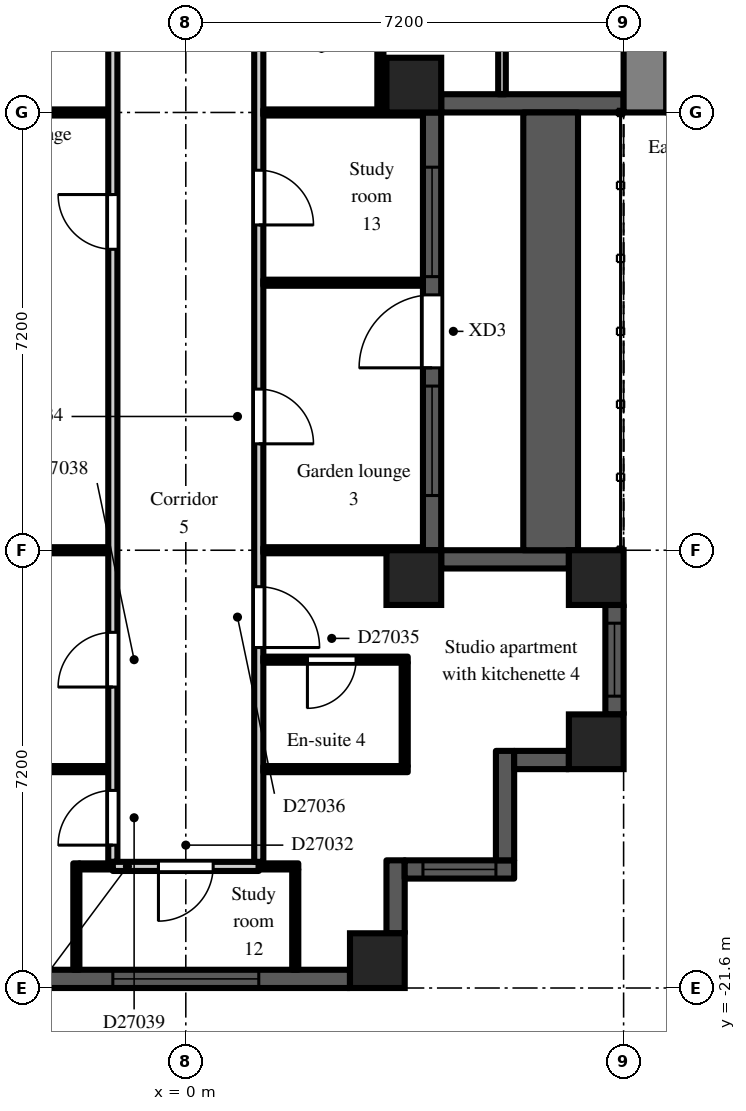
"""IFC4 building model, lengths in metres.
Left out: names, types, materials, properties, quantities, classifications, styles, units other than length and angle.
Written with IfcOpenShell. Run it as: python <this file> out.ifc"""

import sys

from ifc_helpers import new_model, si_unit, direction, frame, frame_2d, origin, origin_2d, place, context, subcontext, project, spatial, rectangle, extrude, element, fill, save


model = new_model("IFC4")
c1 = context("Model", 3, precision=1e-05, world=origin(), true_north=direction((0.0, 1.0)))
c2 = subcontext(c1, "Body", "Model", "MODEL_VIEW")
j1 = project(units=[si_unit("LENGTHUNIT", "METRE"), si_unit("PLANEANGLEUNIT", "RADIAN")], contexts=[c1])
p1 = place(None, origin())
s1 = spatial("IfcSite", under=j1, at=p1, CompositionType="ELEMENT")
p2 = place(p1, origin())
s2 = spatial("IfcBuilding", under=s1, at=p2, CompositionType="ELEMENT")
p3 = place(p2, frame((0.0, 0.0, 188.7)))
s3 = spatial("IfcBuildingStorey", under=s2, at=p3, CompositionType="ELEMENT", Elevation=188.7)
for number, where, z_axis, x_axis in (
    (1, (3.15, -21.15, 0.0), (0.0, 0.0, 1.0), (1.0, 0.0, 0.0)),
    (2, (3.75, -14.85, 0.0), (0.0, 0.0, 1.0), (1.0, 0.0, 0.0)),
    (3, (3.75, -6.75, 0.0), (0.0, 0.0, 1.0), (1.0, 0.0, 0.0)),
    (4, (6.75, -17.55, 0.0), (0.0, 0.0, 1.0), (1.0, 0.0, 0.0)),
    (5, (6.75, -14.85, 0.0), (0.0, 0.0, 1.0), (1.0, 0.0, 0.0)),
):
    element("IfcColumn", number, at=place(p3, frame(where, z_axis=z_axis, x_axis=x_axis)), inside=s3, PredefinedType="COLUMN", context=c2, shape_type="SweptSolid", body=[
        extrude(rectangle(XDim=0.9, YDim=0.9, at=origin_2d()), origin(), (0.0, 0.0, 1.0), 3.0),
    ])
p4 = place(p3, frame((-2.7, -21.45, 0.0), z_axis=(0.0, 0.0, 1.0), x_axis=(1.0, 0.0, 0.0)))
e6 = element("IfcWall", 6, at=p4, inside=s3, PredefinedType="SOLIDWALL", context=c2, shape_type="SweptSolid", body=[
    extrude(rectangle(XDim=5.4, YDim=0.3, at=frame_2d((2.7, 0.0))), origin(), (0.0, 0.0, 1.0), 2.2),
])
p5 = place(p4, frame((1.5, 0.0, 0.2)))
e7 = element("IfcOpeningElement", 7, at=p5, cuts=e6, PredefinedType="OPENING", context=c2, shape_type="SweptSolid", body=[
    extrude(rectangle(XDim=2.4, YDim=1.85, at=frame_2d((1.2, 0.925))), frame((0.0, 0.16, 0.0), z_axis=(0.0, -1.0, 0.0), x_axis=(1.0, 0.0, 0.0)), (0.0, 0.0, 1.0), 0.32),
])
p6 = place(p3, frame((3.45, -20.7, 0.0), z_axis=(0.0, 0.0, 1.0), x_axis=(0.0, 1.0, 0.0)))
e8 = element("IfcWall", 8, at=p6, inside=s3, PredefinedType="SOLIDWALL", context=c2, shape_type="SweptSolid", body=[
    extrude(rectangle(XDim=1.2, YDim=0.3, at=frame_2d((0.6, 0.0))), origin(), (0.0, 0.0, 1.0), 2.6),
])
p7 = place(p3, frame((3.6, -19.65, 0.0), z_axis=(0.0, 0.0, 1.0), x_axis=(1.0, 0.0, 0.0)))
e9 = element("IfcWall", 9, at=p7, inside=s3, PredefinedType="SOLIDWALL", context=c2, shape_type="SweptSolid", body=[
    extrude(rectangle(XDim=1.8, YDim=0.3, at=frame_2d((0.9, 0.0))), origin(), (0.0, 0.0, 1.0), 2.6),
])
p8 = place(p7, frame((0.3, 0.0, 0.2)))
e10 = element("IfcOpeningElement", 10, at=p8, cuts=e9, PredefinedType="OPENING", context=c2, shape_type="SweptSolid", body=[
    extrude(rectangle(XDim=1.2, YDim=1.85, at=frame_2d((0.6, 0.925))), frame((0.0, 0.16, 0.0), z_axis=(0.0, -1.0, 0.0), x_axis=(1.0, 0.0, 0.0)), (0.0, 0.0, 1.0), 0.32),
])
p9 = place(p3, frame((5.25, -19.5, 0.0), z_axis=(0.0, 0.0, 1.0), x_axis=(0.0, 1.0, 0.0)))
e11 = element("IfcWall", 11, at=p9, inside=s3, PredefinedType="SOLIDWALL", context=c2, shape_type="SweptSolid", body=[
    extrude(rectangle(XDim=1.8, YDim=0.3, at=frame_2d((0.9, 0.0))), origin(), (0.0, 0.0, 1.0), 2.6),
])
p10 = place(p3, frame((5.4, -17.85, 0.0), z_axis=(0.0, 0.0, 1.0), x_axis=(1.0, 0.0, 0.0)))
e12 = element("IfcWall", 12, at=p10, inside=s3, PredefinedType="SOLIDWALL", context=c2, shape_type="SweptSolid", body=[
    extrude(rectangle(XDim=0.9, YDim=0.3, at=frame_2d((0.45, 0.0))), origin(), (0.0, 0.0, 1.0), 2.6),
])
p11 = place(p3, frame((7.05, -17.1, 0.0), z_axis=(0.0, 0.0, 1.0), x_axis=(0.0, 1.0, 0.0)))
e13 = element("IfcWall", 13, at=p11, inside=s3, PredefinedType="SOLIDWALL", context=c2, shape_type="SweptSolid", body=[
    extrude(rectangle(XDim=1.8, YDim=0.3, at=frame_2d((0.9, 0.0))), origin(), (0.0, 0.0, 1.0), 2.2),
])
p12 = place(p11, frame((0.3, 0.0, 0.2)))
e14 = element("IfcOpeningElement", 14, at=p12, cuts=e13, PredefinedType="OPENING", context=c2, shape_type="SweptSolid", body=[
    extrude(rectangle(XDim=1.2, YDim=1.85, at=frame_2d((0.6, 0.925))), frame((0.0, 0.16, 0.0), z_axis=(0.0, -1.0, 0.0), x_axis=(1.0, 0.0, 0.0)), (0.0, 0.0, 1.0), 0.32),
])
p13 = place(p3, frame((6.3, -14.55, 0.0), z_axis=(0.0, 0.0, 1.0), x_axis=(-1.0, 0.0, 0.0)))
e15 = element("IfcWall", 15, at=p13, inside=s3, PredefinedType="SOLIDWALL", context=c2, shape_type="SweptSolid", body=[
    extrude(rectangle(XDim=2.1, YDim=0.3, at=frame_2d((1.05, 0.0))), origin(), (0.0, 0.0, 1.0), 2.2),
])
p14 = place(p3, frame((4.05, -14.4, 0.0), z_axis=(0.0, 0.0, 1.0), x_axis=(0.0, 1.0, 0.0)))
e16 = element("IfcWall", 16, at=p14, inside=s3, PredefinedType="SOLIDWALL", context=c2, shape_type="SweptSolid", body=[
    extrude(rectangle(XDim=7.2, YDim=0.3, at=frame_2d((3.6, 0.0))), origin(), (0.0, 0.0, 1.0), 2.2),
])
p15 = place(p14, frame((3.0, 0.0, 0.0)))
e17 = element("IfcOpeningElement", 17, at=p15, cuts=e16, PredefinedType="OPENING", context=c2, shape_type="SweptSolid", body=[
    extrude(rectangle(XDim=1.2, YDim=2.05, at=frame_2d((0.6, 1.025))), frame((0.0, 0.16, 0.0), z_axis=(0.0, -1.0, 0.0), x_axis=(1.0, 0.0, 0.0)), (0.0, 0.0, 1.0), 0.32),
])
p16 = place(p14, frame((0.9, 0.0, 0.2)))
e18 = element("IfcOpeningElement", 18, at=p16, cuts=e16, PredefinedType="OPENING", context=c2, shape_type="SweptSolid", body=[
    extrude(rectangle(XDim=1.8, YDim=1.85, at=frame_2d((0.9, 0.925))), frame((0.0, 0.16, 0.0), z_axis=(0.0, -1.0, 0.0), x_axis=(1.0, 0.0, 0.0)), (0.0, 0.0, 1.0), 0.32),
])
p17 = place(p14, frame((4.5, 0.0, 0.2)))
e19 = element("IfcOpeningElement", 19, at=p17, cuts=e16, PredefinedType="OPENING", context=c2, shape_type="SweptSolid", body=[
    extrude(rectangle(XDim=1.8, YDim=1.85, at=frame_2d((0.9, 0.925))), frame((0.0, 0.16, 0.0), z_axis=(0.0, -1.0, 0.0), x_axis=(1.0, 0.0, 0.0)), (0.0, 0.0, 1.0), 0.32),
])
p18 = place(p3, frame((4.2, -7.05, 0.0), z_axis=(0.0, 0.0, 1.0), x_axis=(1.0, 0.0, 0.0)))
e20 = element("IfcWall", 20, at=p18, inside=s3, PredefinedType="SOLIDWALL", context=c2, shape_type="SweptSolid", body=[
    extrude(rectangle(XDim=3.0, YDim=0.3, at=frame_2d((1.5, 0.0))), origin(), (0.0, 0.0, 1.0), 2.2),
])
p19 = place(p3, frame((6.0, -14.4, 0.0), z_axis=(0.0, 0.0, 1.0), x_axis=(0.0, 1.0, 0.0)))
e21 = element("IfcWall", 21, at=p19, inside=s3, PredefinedType="PARAPET", context=c2, shape_type="SweptSolid", body=[
    extrude(rectangle(XDim=7.2, YDim=0.9, at=frame_2d((3.6, 0.0))), origin(), (0.0, 0.0, 1.0), 0.8),
])
p20 = place(p3, frame((7.55, -7.2, 0.0), z_axis=(0.0, 0.0, 1.0), x_axis=(0.0, 1.0, 0.0)))
e22 = element("IfcWall", 22, at=p20, inside=s3, PredefinedType="SHEAR", context=c2, shape_type="SweptSolid", body=[
    extrude(rectangle(XDim=14.4, YDim=0.7, at=frame_2d((7.2, 0.0))), origin(), (0.0, 0.0, 1.0), 2.6),
])
p21 = place(p20, frame((6.0, 0.0, 0.0)))
e23 = element("IfcOpeningElement", 23, at=p21, cuts=e22, PredefinedType="OPENING", context=c2, shape_type="SweptSolid", body=[
    extrude(rectangle(XDim=2.4, YDim=2.2, at=frame_2d((1.2, 1.1))), frame((0.0, 0.36, 0.0), z_axis=(0.0, -1.0, 0.0), x_axis=(1.0, 0.0, 0.0)), (0.0, 0.0, 1.0), 0.72),
])
p22 = place(p3, frame((-5.1, -18.0, 0.0), z_axis=(0.0, 0.0, 1.0), x_axis=(1.0, 0.0, 0.0)))
e24 = element("IfcWall", 24, at=p22, inside=s3, PredefinedType="PARTITIONING", context=c2, shape_type="SweptSolid", body=[
    extrude(rectangle(XDim=3.825, YDim=0.1, at=frame_2d((1.913, 0.0))), origin(), (0.0, 0.0, 1.0), 2.6),
])
for number, where, z_axis, x_axis in (
    (25, (-3.9, -14.4, 0.0), (0.0, 0.0, 1.0), (1.0, 0.0, 0.0)),
    (26, (-3.9, -7.2, 0.0), (0.0, 0.0, 1.0), (1.0, 0.0, 0.0)),
):
    element("IfcWall", number, at=place(p3, frame(where, z_axis=z_axis, x_axis=x_axis)), inside=s3, PredefinedType="PARTITIONING", context=c2, shape_type="SweptSolid", body=[
        extrude(rectangle(XDim=2.625, YDim=0.1, at=frame_2d((1.312, 0.0))), origin(), (0.0, 0.0, 1.0), 2.6),
    ])
p23 = place(p3, frame((-1.8, -21.3, 0.0), z_axis=(0.0, 0.0, 1.0), x_axis=(0.0, 1.0, 0.0)))
e27 = element("IfcWall", 27, at=p23, inside=s3, PredefinedType="PARTITIONING", context=c2, shape_type="SweptSolid", body=[
    extrude(rectangle(XDim=1.75, YDim=0.1, at=frame_2d((0.875, 0.0))), origin(), (0.0, 0.0, 1.0), 2.6),
])
p24 = place(p3, frame((-1.75, -19.6, 0.0), z_axis=(0.0, 0.0, 1.0), x_axis=(1.0, 0.0, 0.0)))
e28 = element("IfcWall", 28, at=p24, inside=s3, PredefinedType="PARTITIONING", context=c2, shape_type="SweptSolid", body=[
    extrude(rectangle(XDim=0.55, YDim=0.1, at=frame_2d((0.275, 0.0))), origin(), (0.0, 0.0, 1.0), 2.6),
])
p25 = place(p3, frame((-1.2, -19.525, 0.0), z_axis=(0.0, 0.0, 1.0), x_axis=(0.0, 1.0, 0.0)))
e29 = element("IfcWall", 29, at=p25, inside=s3, PredefinedType="PARTITIONING", context=c2, shape_type="SweptSolid", body=[
    extrude(rectangle(XDim=18.25, YDim=0.15, at=frame_2d((9.125, 0.0))), origin(), (0.0, 0.0, 1.0), 2.6),
])
p26 = place(p25, frame((10.075, 0.0, 0.0)))
e30 = element("IfcOpeningElement", 30, at=p26, cuts=e29, PredefinedType="OPENING", context=c2, shape_type="SweptSolid", body=[
    extrude(rectangle(XDim=0.9, YDim=2.1, at=frame_2d((0.45, 1.05))), frame((0.0, 0.085, 0.0), z_axis=(0.0, -1.0, 0.0), x_axis=(1.0, 0.0, 0.0)), (0.0, 0.0, 1.0), 0.17),
])
p27 = place(p25, frame((2.875, 0.0, 0.0)))
e31 = element("IfcOpeningElement", 31, at=p27, cuts=e29, PredefinedType="OPENING", context=c2, shape_type="SweptSolid", body=[
    extrude(rectangle(XDim=0.9, YDim=2.1, at=frame_2d((0.45, 1.05))), frame((0.0, 0.085, 0.0), z_axis=(0.0, -1.0, 0.0), x_axis=(1.0, 0.0, 0.0)), (0.0, 0.0, 1.0), 0.17),
])
p28 = place(p25, frame((0.275, 0.0, 0.0)))
e32 = element("IfcOpeningElement", 32, at=p28, cuts=e29, PredefinedType="OPENING", context=c2, shape_type="SweptSolid", body=[
    extrude(rectangle(XDim=0.9, YDim=2.1, at=frame_2d((0.45, 1.05))), frame((0.0, 0.085, 0.0), z_axis=(0.0, -1.0, 0.0), x_axis=(1.0, 0.0, 0.0)), (0.0, 0.0, 1.0), 0.17),
])
p29 = place(p3, frame((-1.2, -19.6, 0.0), z_axis=(0.0, 0.0, 1.0), x_axis=(1.0, 0.0, 0.0)))
e33 = element("IfcWall", 33, at=p29, inside=s3, PredefinedType="PARTITIONING", context=c2, shape_type="SweptSolid", body=[
    extrude(rectangle(XDim=2.4, YDim=0.15, at=frame_2d((1.2, 0.0))), origin(), (0.0, 0.0, 1.0), 2.6),
])
p30 = place(p29, frame((0.75, 0.0, 0.0)))
e34 = element("IfcOpeningElement", 34, at=p30, cuts=e33, PredefinedType="OPENING", context=c2, shape_type="SweptSolid", body=[
    extrude(rectangle(XDim=0.9, YDim=2.1, at=frame_2d((0.45, 1.05))), frame((0.0, 0.085, 0.0), z_axis=(0.0, -1.0, 0.0), x_axis=(1.0, 0.0, 0.0)), (0.0, 0.0, 1.0), 0.17),
])
p31 = place(p3, frame((1.2, -19.525, 0.0), z_axis=(0.0, 0.0, 1.0), x_axis=(0.0, 1.0, 0.0)))
e35 = element("IfcWall", 35, at=p31, inside=s3, PredefinedType="PARTITIONING", context=c2, shape_type="SweptSolid", body=[
    extrude(rectangle(XDim=18.4, YDim=0.15, at=frame_2d((9.2, 0.0))), origin(), (0.0, 0.0, 1.0), 2.6),
])
p32 = place(p31, frame((14.875, 0.0, 0.0)))
e36 = element("IfcOpeningElement", 36, at=p32, cuts=e35, PredefinedType="OPENING", context=c2, shape_type="SweptSolid", body=[
    extrude(rectangle(XDim=0.9, YDim=2.1, at=frame_2d((0.45, 1.05))), frame((0.0, 0.085, 0.0), z_axis=(0.0, -1.0, 0.0), x_axis=(1.0, 0.0, 0.0)), (0.0, 0.0, 1.0), 0.17),
])
p33 = place(p31, frame((10.475, 0.0, 0.0)))
e37 = element("IfcOpeningElement", 37, at=p33, cuts=e35, PredefinedType="OPENING", context=c2, shape_type="SweptSolid", body=[
    extrude(rectangle(XDim=0.9, YDim=2.1, at=frame_2d((0.45, 1.05))), frame((0.0, 0.085, 0.0), z_axis=(0.0, -1.0, 0.0), x_axis=(1.0, 0.0, 0.0)), (0.0, 0.0, 1.0), 0.17),
])
p34 = place(p31, frame((6.875, 0.0, 0.0)))
e38 = element("IfcOpeningElement", 38, at=p34, cuts=e35, PredefinedType="OPENING", context=c2, shape_type="SweptSolid", body=[
    extrude(rectangle(XDim=0.9, YDim=2.1, at=frame_2d((0.45, 1.05))), frame((0.0, 0.085, 0.0), z_axis=(0.0, -1.0, 0.0), x_axis=(1.0, 0.0, 0.0)), (0.0, 0.0, 1.0), 0.17),
])
p35 = place(p31, frame((3.525, 0.0, 0.0)))
e39 = element("IfcOpeningElement", 39, at=p35, cuts=e35, PredefinedType="OPENING", context=c2, shape_type="SweptSolid", body=[
    extrude(rectangle(XDim=1.0, YDim=2.1, at=frame_2d((0.5, 1.05))), frame((0.0, 0.085, 0.0), z_axis=(0.0, -1.0, 0.0), x_axis=(1.0, 0.0, 0.0)), (0.0, 0.0, 1.0), 0.17),
])
p36 = place(p3, frame((1.2, -19.6, 0.0), z_axis=(0.0, 0.0, 1.0), x_axis=(1.0, 0.0, 0.0)))
e40 = element("IfcWall", 40, at=p36, inside=s3, PredefinedType="PARTITIONING", context=c2, shape_type="SweptSolid", body=[
    extrude(rectangle(XDim=0.65, YDim=0.1, at=frame_2d((0.325, 0.0))), origin(), (0.0, 0.0, 1.0), 2.6),
])
p37 = place(p3, frame((1.275, -18.0, 0.0), z_axis=(0.0, 0.0, 1.0), x_axis=(1.0, 0.0, 0.0)))
e41 = element("IfcWall", 41, at=p37, inside=s3, PredefinedType="PARTITIONING", context=c2, shape_type="SweptSolid", body=[
    extrude(rectangle(XDim=2.375, YDim=0.1, at=frame_2d((1.188, 0.0))), origin(), (0.0, 0.0, 1.0), 2.6),
])
p38 = place(p3, frame((1.275, -16.2, 0.0), z_axis=(0.0, 0.0, 1.0), x_axis=(1.0, 0.0, 0.0)))
e42 = element("IfcWall", 42, at=p38, inside=s3, PredefinedType="PARTITIONING", context=c2, shape_type="SweptSolid", body=[
    extrude(rectangle(XDim=2.375, YDim=0.1, at=frame_2d((1.188, 0.0))), origin(), (0.0, 0.0, 1.0), 2.6),
])
p39 = place(p38, frame((0.725, 0.0, 0.0)))
e43 = element("IfcOpeningElement", 43, at=p39, cuts=e42, PredefinedType="OPENING", context=c2, shape_type="SweptSolid", body=[
    extrude(rectangle(XDim=0.8, YDim=2.1, at=frame_2d((0.4, 1.05))), frame((0.0, 0.06, 0.0), z_axis=(0.0, -1.0, 0.0), x_axis=(1.0, 0.0, 0.0)), (0.0, 0.0, 1.0), 0.12),
])
for number, where, z_axis, x_axis in (
    (44, (1.275, -14.4, 0.0), (0.0, 0.0, 1.0), (1.0, 0.0, 0.0)),
    (45, (1.275, -10.0, 0.0), (0.0, 0.0, 1.0), (1.0, 0.0, 0.0)),
    (46, (1.275, -7.2, 0.0), (0.0, 0.0, 1.0), (1.0, 0.0, 0.0)),
):
    element("IfcWall", number, at=place(p3, frame(where, z_axis=z_axis, x_axis=x_axis)), inside=s3, PredefinedType="PARTITIONING", context=c2, shape_type="SweptSolid", body=[
        extrude(rectangle(XDim=2.625, YDim=0.1, at=frame_2d((1.312, 0.0))), origin(), (0.0, 0.0, 1.0), 2.6),
    ])
p40 = place(p3, frame((1.8, -21.3, 0.0), z_axis=(0.0, 0.0, 1.0), x_axis=(0.0, 1.0, 0.0)))
e47 = element("IfcWall", 47, at=p40, inside=s3, PredefinedType="PARTITIONING", context=c2, shape_type="SweptSolid", body=[
    extrude(rectangle(XDim=1.65, YDim=0.1, at=frame_2d((0.825, 0.0))), origin(), (0.0, 0.0, 1.0), 2.6),
])
p41 = place(p3, frame((3.2, -7.15, 0.0), z_axis=(0.0, 0.0, 1.0), x_axis=(0.0, 1.0, 0.0)))
e48 = element("IfcWall", 48, at=p41, inside=s3, PredefinedType="PARTITIONING", context=c2, shape_type="SweptSolid", body=[
    extrude(rectangle(XDim=5.875, YDim=0.1, at=frame_2d((2.938, 0.0))), origin(), (0.0, 0.0, 1.0), 2.6),
])
p42 = place(p3, frame((3.6, -17.95, 0.0), z_axis=(0.0, 0.0, 1.0), x_axis=(0.0, 1.0, 0.0)))
e49 = element("IfcWall", 49, at=p42, inside=s3, PredefinedType="PARTITIONING", context=c2, shape_type="SweptSolid", body=[
    extrude(rectangle(XDim=1.7, YDim=0.1, at=frame_2d((0.85, 0.0))), origin(), (0.0, 0.0, 1.0), 2.6),
])
p43 = place(p3, frame((5.2, -6.9, 0.0), z_axis=(0.0, 0.0, 1.0), x_axis=(0.0, 1.0, 0.0)))
e50 = element("IfcWall", 50, at=p43, inside=s3, PredefinedType="PARTITIONING", context=c2, shape_type="SweptSolid", body=[
    extrude(rectangle(XDim=5.625, YDim=0.125, at=frame_2d((2.812, 0.0))), origin(), (0.0, 0.0, 1.0), 2.6),
])
p44 = place(p5, origin())
e51 = element("IfcWindow", 51, at=p44, inside=s3, PartitioningType="SINGLE_PANEL", PredefinedType="WINDOW", context=c2, shape_type="SweptSolid", body=[
    extrude(rectangle(XDim=2.4, YDim=1.85, at=frame_2d((1.2, 0.925))), frame((0.0, 0.03, 0.0), z_axis=(0.0, -1.0, 0.0), x_axis=(1.0, 0.0, 0.0)), (0.0, 0.0, 1.0), 0.06),
])
fill(e7, e51)
p45 = place(p8, origin())
e52 = element("IfcWindow", 52, at=p45, inside=s3, PartitioningType="SINGLE_PANEL", PredefinedType="WINDOW", context=c2, shape_type="SweptSolid", body=[
    extrude(rectangle(XDim=1.2, YDim=1.85, at=frame_2d((0.6, 0.925))), frame((0.0, 0.03, 0.0), z_axis=(0.0, -1.0, 0.0), x_axis=(1.0, 0.0, 0.0)), (0.0, 0.0, 1.0), 0.06),
])
fill(e10, e52)
p46 = place(p12, origin())
e53 = element("IfcWindow", 53, at=p46, inside=s3, PartitioningType="SINGLE_PANEL", PredefinedType="WINDOW", context=c2, shape_type="SweptSolid", body=[
    extrude(rectangle(XDim=1.2, YDim=1.85, at=frame_2d((0.6, 0.925))), frame((0.0, 0.03, 0.0), z_axis=(0.0, -1.0, 0.0), x_axis=(1.0, 0.0, 0.0)), (0.0, 0.0, 1.0), 0.06),
])
fill(e14, e53)
p47 = place(p15, origin())
e54 = element("IfcDoor", 54, at=p47, inside=s3, OperationType="SINGLE_SWING_LEFT", PredefinedType="DOOR", context=c2, shape_type="SweptSolid", body=[
    extrude(rectangle(XDim=1.2, YDim=2.05, at=frame_2d((0.6, 1.025))), frame((0.0, 0.025, 0.0), z_axis=(0.0, -1.0, 0.0), x_axis=(1.0, 0.0, 0.0)), (0.0, 0.0, 1.0), 0.05),
])
fill(e17, e54)
p48 = place(p16, origin())
e55 = element("IfcWindow", 55, at=p48, inside=s3, PartitioningType="SINGLE_PANEL", PredefinedType="WINDOW", context=c2, shape_type="SweptSolid", body=[
    extrude(rectangle(XDim=1.8, YDim=1.85, at=frame_2d((0.9, 0.925))), frame((0.0, 0.03, 0.0), z_axis=(0.0, -1.0, 0.0), x_axis=(1.0, 0.0, 0.0)), (0.0, 0.0, 1.0), 0.06),
])
fill(e18, e55)
p49 = place(p17, origin())
e56 = element("IfcWindow", 56, at=p49, inside=s3, PartitioningType="SINGLE_PANEL", PredefinedType="WINDOW", context=c2, shape_type="SweptSolid", body=[
    extrude(rectangle(XDim=1.8, YDim=1.85, at=frame_2d((0.9, 0.925))), frame((0.0, 0.03, 0.0), z_axis=(0.0, -1.0, 0.0), x_axis=(1.0, 0.0, 0.0)), (0.0, 0.0, 1.0), 0.06),
])
fill(e19, e56)
p50 = place(p30, frame((0.9, 0.0, 0.0), z_axis=(0.0, 0.0, 1.0), x_axis=(-1.0, 0.0, 0.0)))
e57 = element("IfcDoor", 57, at=p50, inside=s3, OperationType="SINGLE_SWING_RIGHT", PredefinedType="DOOR", context=c2, shape_type="SweptSolid", body=[
    extrude(rectangle(XDim=0.9, YDim=2.1, at=frame_2d((0.45, 1.05))), frame((0.0, 0.025, 0.0), z_axis=(0.0, -1.0, 0.0), x_axis=(1.0, 0.0, 0.0)), (0.0, 0.0, 1.0), 0.05),
])
fill(e34, e57)
p51 = place(p33, frame((0.9, 0.0, 0.0), z_axis=(0.0, 0.0, 1.0), x_axis=(-1.0, 0.0, 0.0)))
e58 = element("IfcDoor", 58, at=p51, inside=s3, OperationType="SINGLE_SWING_RIGHT", PredefinedType="DOOR", context=c2, shape_type="SweptSolid", body=[
    extrude(rectangle(XDim=0.9, YDim=2.1, at=frame_2d((0.45, 1.05))), frame((0.0, 0.025, 0.0), z_axis=(0.0, -1.0, 0.0), x_axis=(1.0, 0.0, 0.0)), (0.0, 0.0, 1.0), 0.05),
])
fill(e37, e58)
p52 = place(p34, frame((0.9, 0.0, 0.0), z_axis=(0.0, 0.0, 1.0), x_axis=(-1.0, 0.0, 0.0)))
e59 = element("IfcDoor", 59, at=p52, inside=s3, OperationType="SINGLE_SWING_RIGHT", PredefinedType="DOOR", context=c2, shape_type="SweptSolid", body=[
    extrude(rectangle(XDim=0.9, YDim=2.1, at=frame_2d((0.45, 1.05))), frame((0.0, 0.025, 0.0), z_axis=(0.0, -1.0, 0.0), x_axis=(1.0, 0.0, 0.0)), (0.0, 0.0, 1.0), 0.05),
])
fill(e38, e59)
p53 = place(p39, frame((0.8, 0.0, 0.0), z_axis=(0.0, 0.0, 1.0), x_axis=(-1.0, 0.0, 0.0)))
e60 = element("IfcDoor", 60, at=p53, inside=s3, OperationType="SINGLE_SWING_RIGHT", PredefinedType="DOOR", context=c2, shape_type="SweptSolid", body=[
    extrude(rectangle(XDim=0.8, YDim=2.1, at=frame_2d((0.4, 1.05))), frame((0.0, 0.025, 0.0), z_axis=(0.0, -1.0, 0.0), x_axis=(1.0, 0.0, 0.0)), (0.0, 0.0, 1.0), 0.05),
])
fill(e43, e60)
p54 = place(p35, frame((1.0, 0.0, 0.0), z_axis=(0.0, 0.0, 1.0), x_axis=(-1.0, 0.0, 0.0)))
e61 = element("IfcDoor", 61, at=p54, inside=s3, OperationType="SINGLE_SWING_RIGHT", PredefinedType="DOOR", context=c2, shape_type="SweptSolid", body=[
    extrude(rectangle(XDim=1.0, YDim=2.1, at=frame_2d((0.5, 1.05))), frame((0.0, 0.025, 0.0), z_axis=(0.0, -1.0, 0.0), x_axis=(1.0, 0.0, 0.0)), (0.0, 0.0, 1.0), 0.05),
])
fill(e39, e61)
p55 = place(p26, origin())
e62 = element("IfcDoor", 62, at=p55, inside=s3, OperationType="SINGLE_SWING_RIGHT", PredefinedType="DOOR", context=c2, shape_type="SweptSolid", body=[
    extrude(rectangle(XDim=0.9, YDim=2.1, at=frame_2d((0.45, 1.05))), frame((0.0, 0.025, 0.0), z_axis=(0.0, -1.0, 0.0), x_axis=(1.0, 0.0, 0.0)), (0.0, 0.0, 1.0), 0.05),
])
fill(e30, e62)
p56 = place(p27, origin())
e63 = element("IfcDoor", 63, at=p56, inside=s3, OperationType="SINGLE_SWING_LEFT", PredefinedType="DOOR", context=c2, shape_type="SweptSolid", body=[
    extrude(rectangle(XDim=0.9, YDim=2.1, at=frame_2d((0.45, 1.05))), frame((0.0, 0.025, 0.0), z_axis=(0.0, -1.0, 0.0), x_axis=(1.0, 0.0, 0.0)), (0.0, 0.0, 1.0), 0.05),
])
fill(e31, e63)
p57 = place(p28, origin())
e64 = element("IfcDoor", 64, at=p57, inside=s3, OperationType="SINGLE_SWING_LEFT", PredefinedType="DOOR", context=c2, shape_type="SweptSolid", body=[
    extrude(rectangle(XDim=0.9, YDim=2.1, at=frame_2d((0.45, 1.05))), frame((0.0, 0.025, 0.0), z_axis=(0.0, -1.0, 0.0), x_axis=(1.0, 0.0, 0.0)), (0.0, 0.0, 1.0), 0.05),
])
fill(e32, e64)
save(model, sys.argv[1])
